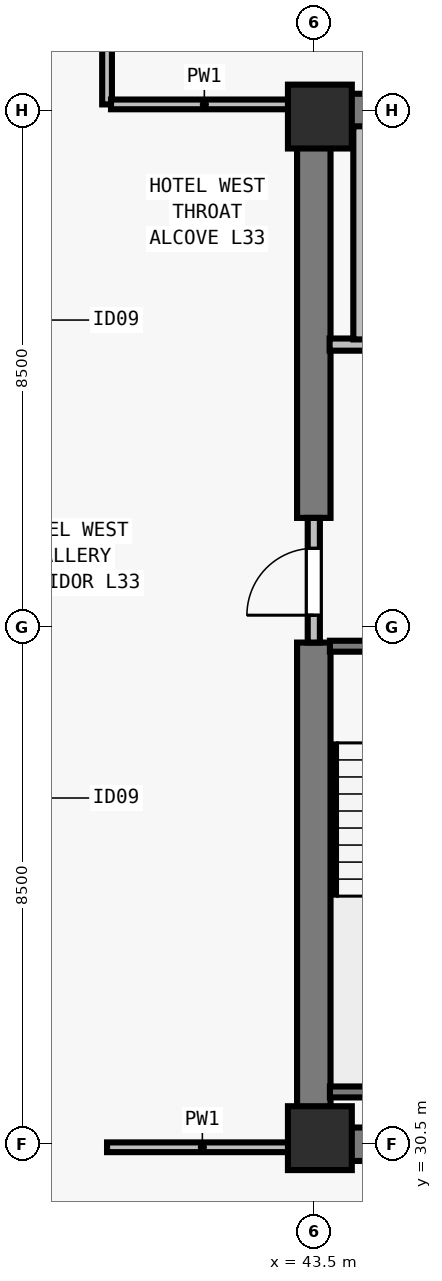
"""IFC4 building model, lengths in metres.
Left out: names, types, materials, properties, quantities, classifications, styles, units other than length and angle.
Written with IfcOpenShell. Run it as: python <this file> out.ifc"""

import sys

from ifc_helpers import new_model, si_unit, direction, frame, frame_2d, origin, origin_2d, place, context, subcontext, project, spatial, rectangle, extrude, element, fill, save


model = new_model("IFC4")
c1 = context("Model", 3, precision=1e-05, world=origin(), true_north=direction((0.0, 1.0)))
c2 = subcontext(c1, "Body", "Model", "MODEL_VIEW")
j1 = project(units=[si_unit("LENGTHUNIT", "METRE"), si_unit("PLANEANGLEUNIT", "RADIAN")], contexts=[c1])
p1 = place(None, origin())
s1 = spatial("IfcSite", under=j1, at=p1, CompositionType="ELEMENT")
p2 = place(p1, origin())
s2 = spatial("IfcBuilding", under=s1, at=p2, CompositionType="ELEMENT")
p3 = place(p2, frame((0.0, 0.0, 123.5)))
s3 = spatial("IfcBuildingStorey", under=s2, at=p3, CompositionType="ELEMENT", Elevation=123.5)
for number, where, z_axis, x_axis in (
    (1, (43.6, 30.6, 0.0), (0.0, 0.0, 1.0), (1.0, 0.0, 0.0)),
    (2, (43.6, 47.4, 0.0), (0.0, 0.0, 1.0), (1.0, 0.0, 0.0)),
):
    element("IfcColumn", number, at=place(p3, frame(where, z_axis=z_axis, x_axis=x_axis)), inside=s3, PredefinedType="COLUMN", context=c2, shape_type="SweptSolid", body=[
        extrude(rectangle(XDim=1.05, YDim=1.05, at=origin_2d()), origin(), (0.0, 0.0, 1.0), 3.5),
    ])
for number, where, z_axis, x_axis in (
    (3, (43.225, 30.5, 0.0), (0.0, 0.0, 1.0), (1.0, 0.0, 0.0)),
    (4, (43.225, 47.5, 0.0), (0.0, 0.0, 1.0), (1.0, 0.0, 0.0)),
):
    element("IfcWall", number, at=place(p3, frame(where, z_axis=z_axis, x_axis=x_axis)), inside=s3, PredefinedType="SHEAR", context=c2, shape_type="SweptSolid", body=[
        extrude(rectangle(XDim=17.55, YDim=0.55, at=frame_2d((8.775, 0.0))), origin(), (0.0, 0.0, 1.0), 3.28),
    ])
p4 = place(p3, frame((43.5, 30.765, 0.0), z_axis=(0.0, 0.0, 1.0), x_axis=(0.0, 1.0, 0.0)))
e5 = element("IfcWall", 5, at=p4, inside=s3, PredefinedType="SHEAR", context=c2, shape_type="SweptSolid", body=[
    extrude(rectangle(XDim=7.985, YDim=0.55, at=frame_2d((3.993, 0.0))), origin(), (0.0, 0.0, 1.0), 3.28),
])
p5 = place(p3, frame((43.5, 40.8, 0.0), z_axis=(0.0, 0.0, 1.0), x_axis=(0.0, 1.0, 0.0)))
e6 = element("IfcWall", 6, at=p5, inside=s3, PredefinedType="SHEAR", context=c2, shape_type="SweptSolid", body=[
    extrude(rectangle(XDim=6.435, YDim=0.55, at=frame_2d((3.218, 0.0))), origin(), (0.0, 0.0, 1.0), 3.28),
])
p6 = place(p3, frame((43.5, 38.75, 0.0), z_axis=(0.0, 0.0, 1.0), x_axis=(0.0, 1.0, 0.0)))
e7 = element("IfcWall", 7, at=p6, inside=s3, PredefinedType="SOLIDWALL", context=c2, shape_type="SweptSolid", body=[
    extrude(rectangle(XDim=2.05, YDim=0.2, at=frame_2d((1.025, 0.0))), origin(), (0.0, 0.0, 1.0), 3.28),
])
p7 = place(p6, frame((0.45, 0.0, 0.0)))
e8 = element("IfcOpeningElement", 8, at=p7, cuts=e7, PredefinedType="OPENING", context=c2, shape_type="SweptSolid", body=[
    extrude(rectangle(XDim=1.1, YDim=2.15, at=frame_2d((0.55, 1.075))), frame((0.0, 0.11, 0.0), z_axis=(0.0, -1.0, 0.0), x_axis=(1.0, 0.0, 0.0)), (0.0, 0.0, 1.0), 0.22),
])
p8 = place(p3, frame((43.76, 43.65, 0.0), z_axis=(0.0, 0.0, 1.0), x_axis=(1.0, 0.0, 0.0)))
e9 = element("IfcWall", 9, at=p8, inside=s3, PredefinedType="SOLIDWALL", context=c2, shape_type="SweptSolid", body=[
    extrude(rectangle(XDim=3.505, YDim=0.2, at=frame_2d((1.752, 0.0))), origin(), (0.0, 0.0, 1.0), 3.28),
])
p9 = place(p8, frame((1.11, 0.0, 0.0)))
e10 = element("IfcOpeningElement", 10, at=p9, cuts=e9, PredefinedType="OPENING", context=c2, shape_type="SweptSolid", body=[
    extrude(rectangle(XDim=1.1, YDim=2.2, at=frame_2d((0.55, 1.1))), frame((0.0, 0.11, 0.0), z_axis=(0.0, -1.0, 0.0), x_axis=(1.0, 0.0, 0.0)), (0.0, 0.0, 1.0), 0.22),
])
p10 = place(p3, frame((44.25, 43.735, 0.0), z_axis=(0.0, 0.0, 1.0), x_axis=(0.0, 1.0, 0.0)))
e11 = element("IfcWall", 11, at=p10, inside=s3, PredefinedType="SOLIDWALL", context=c2, shape_type="SweptSolid", body=[
    extrude(rectangle(XDim=3.505, YDim=0.2, at=frame_2d((1.752, 0.0))), origin(), (0.0, 0.0, 1.0), 3.28),
])
p11 = place(p3, frame((40.1, 47.6, 0.0), z_axis=(0.0, 0.0, 1.0), x_axis=(0.0, 1.0, 0.0)))
e12 = element("IfcWall", 12, at=p11, inside=s3, PredefinedType="PARTITIONING", context=c2, shape_type="SweptSolid", body=[
    extrude(rectangle(XDim=15.075, YDim=0.16, at=frame_2d((7.538, 0.0))), origin(), (0.0, 0.0, 1.0), 2.555),
])
p12 = place(p11, frame((1.8, 0.0, 0.0)))
e13 = element("IfcOpeningElement", 13, at=p12, cuts=e12, PredefinedType="OPENING", context=c2, shape_type="SweptSolid", body=[
    extrude(rectangle(XDim=0.96, YDim=2.12, at=frame_2d((0.48, 1.06))), frame((0.0, 0.09, 0.0), z_axis=(0.0, -1.0, 0.0), x_axis=(1.0, 0.0, 0.0)), (0.0, 0.0, 1.0), 0.18),
])
p13 = place(p3, frame((40.1, 30.45, 0.0), z_axis=(0.0, 0.0, 1.0), x_axis=(1.0, 0.0, 0.0)))
e14 = element("IfcWall", 14, at=p13, inside=s3, PredefinedType="PARTITIONING", context=c2, shape_type="SweptSolid", body=[
    extrude(rectangle(XDim=3.135, YDim=0.16, at=frame_2d((1.567, 0.0))), origin(), (0.0, 0.0, 1.0), 3.28),
])
p14 = place(p3, frame((40.165, 47.6, 0.0), z_axis=(0.0, 0.0, 1.0), x_axis=(1.0, 0.0, 0.0)))
e15 = element("IfcWall", 15, at=p14, inside=s3, PredefinedType="PARTITIONING", context=c2, shape_type="SweptSolid", body=[
    extrude(rectangle(XDim=3.07, YDim=0.16, at=frame_2d((1.535, 0.0))), origin(), (0.0, 0.0, 1.0), 3.28),
])
p15 = place(p3, frame((43.765, 38.69, 0.0), z_axis=(0.0, 0.0, 1.0), x_axis=(1.0, 0.0, 0.0)))
e16 = element("IfcWall", 16, at=p15, inside=s3, PredefinedType="SOLIDWALL", context=c2, shape_type="SweptSolid", body=[
    extrude(rectangle(XDim=3.23, YDim=0.18, at=frame_2d((1.615, 0.0))), origin(), (0.0, 0.0, 1.0), 3.28),
])
p16 = place(p15, frame((1.14, 0.0, 0.0)))
e17 = element("IfcOpeningElement", 17, at=p16, cuts=e16, PredefinedType="OPENING", context=c2, shape_type="SweptSolid", body=[
    extrude(rectangle(XDim=0.95, YDim=2.15, at=frame_2d((0.475, 1.075))), frame((0.0, 0.1, 0.0), z_axis=(0.0, -1.0, 0.0), x_axis=(1.0, 0.0, 0.0)), (0.0, 0.0, 1.0), 0.2),
])
p17 = place(p3, frame((43.765, 31.36, 0.0), z_axis=(0.0, 0.0, 1.0), x_axis=(1.0, 0.0, 0.0)))
e18 = element("IfcWall", 18, at=p17, inside=s3, PredefinedType="SOLIDWALL", context=c2, shape_type="SweptSolid", body=[
    extrude(rectangle(XDim=3.23, YDim=0.18, at=frame_2d((1.615, 0.0))), origin(), (0.0, 0.0, 1.0), 3.28),
])
p18 = place(p7, origin())
e19 = element("IfcDoor", 19, at=p18, inside=s3, OperationType="SINGLE_SWING_LEFT", PredefinedType="DOOR", context=c2, shape_type="SweptSolid", body=[
    extrude(rectangle(XDim=1.1, YDim=2.15, at=frame_2d((0.55, 1.075))), frame((0.0, 0.025, 0.0), z_axis=(0.0, -1.0, 0.0), x_axis=(1.0, 0.0, 0.0)), (0.0, 0.0, 1.0), 0.05),
])
fill(e8, e19)
save(model, sys.argv[1])
